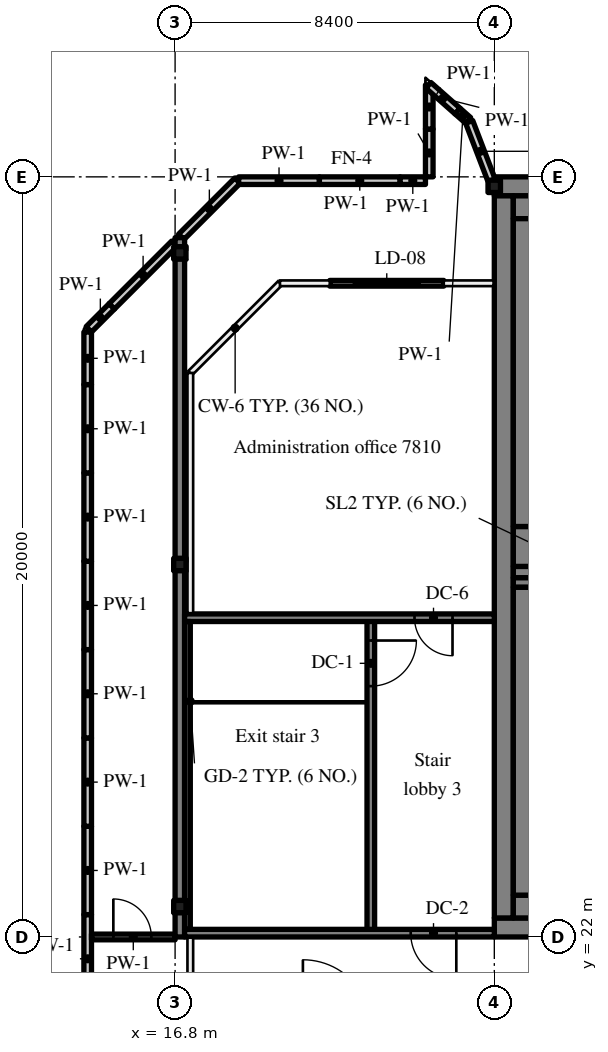
"""IFC4 building model, lengths in metres.
Left out: names, types, materials, properties, quantities, classifications, styles, units other than length and angle.
Written with IfcOpenShell. Run it as: python <this file> out.ifc"""

import sys

from ifc_helpers import new_model, si_unit, direction, frame, frame_2d, origin, origin_2d, place, context, subcontext, project, spatial, rectangle, hollow_circle, extrude, source, transform, mapped, element, fill, save


model = new_model("IFC4")
c1 = context("Model", 3, precision=1e-05, world=origin(), true_north=direction((0.0, 1.0)))
c2 = subcontext(c1, "Body", "Model", "MODEL_VIEW")
j1 = project(units=[si_unit("LENGTHUNIT", "METRE"), si_unit("PLANEANGLEUNIT", "RADIAN")], contexts=[c1])
p1 = place(None, origin())
s1 = spatial("IfcSite", under=j1, at=p1, CompositionType="ELEMENT")
p2 = place(p1, origin())
s2 = spatial("IfcBuilding", under=s1, at=p2, CompositionType="ELEMENT")
p3 = place(p2, frame((0.0, 0.0, 329.7)))
s3 = spatial("IfcBuildingStorey", under=s2, at=p3, CompositionType="ELEMENT", Elevation=329.7)
m1 = source(origin(), c2, "Body", "SweptSolid", [
    extrude(rectangle(XDim=50.4, YDim=0.5, at=frame_2d((25.2, 0.0))), origin(), (0.0, 0.0, 1.0), 4.72),
])
p4 = place(p3, frame((25.2, 22.25, 0.0), z_axis=(0.0, 0.0, 1.0), x_axis=(1.0, 0.0, 0.0)))
e1 = element("IfcWall", 1, at=p4, inside=s3, PredefinedType="SHEAR", context=c2, shape_type="MappedRepresentation", body=[
    mapped(m1, transform((0.0, 0.0, 0.0), scale=1.0)),
])
m2 = source(origin(), c2, "Body", "SweptSolid", [
    extrude(rectangle(XDim=1.8, YDim=2.1, at=frame_2d((0.9, 1.05))), frame((0.0, 0.26, 0.0), z_axis=(0.0, -1.0, 0.0), x_axis=(1.0, 0.0, 0.0)), (0.0, 0.0, 1.0), 0.52),
])
p5 = place(p4, frame((15.9, 0.0, 0.0)))
e2 = element("IfcOpeningElement", 2, at=p5, cuts=e1, PredefinedType="OPENING", context=c2, shape_type="MappedRepresentation", body=[
    mapped(m2, transform((0.0, 0.0, 0.0), scale=1.0)),
])
m3 = source(origin(), c2, "Body", "SweptSolid", [
    extrude(rectangle(XDim=0.9, YDim=2.1, at=frame_2d((0.45, 1.05))), frame((0.0, 0.26, 0.0), z_axis=(0.0, -1.0, 0.0), x_axis=(1.0, 0.0, 0.0)), (0.0, 0.0, 1.0), 0.52),
])
p6 = place(p4, frame((21.525, 0.0, 0.0)))
e3 = element("IfcOpeningElement", 3, at=p6, cuts=e1, PredefinedType="OPENING", context=c2, shape_type="MappedRepresentation", body=[
    mapped(m3, transform((0.0, 0.0, 0.0), scale=1.0)),
])
p7 = place(p4, frame((32.7, 0.0, 0.0)))
e4 = element("IfcOpeningElement", 4, at=p7, cuts=e1, PredefinedType="OPENING", context=c2, shape_type="MappedRepresentation", body=[
    mapped(m2, transform((0.0, 0.0, 0.0), scale=1.0)),
])
p8 = place(p4, frame((39.825, 0.0, 0.0)))
e5 = element("IfcOpeningElement", 5, at=p8, cuts=e1, PredefinedType="OPENING", context=c2, shape_type="MappedRepresentation", body=[
    mapped(m3, transform((0.0, 0.0, 0.0), scale=1.0)),
])
p9 = place(p4, frame((27.975, 0.0, 0.0)))
e6 = element("IfcOpeningElement", 6, at=p9, cuts=e1, PredefinedType="OPENING", context=c2, shape_type="MappedRepresentation", body=[
    mapped(m3, transform((0.0, 0.0, 0.0), scale=1.0)),
])
m4 = source(origin(), c2, "Body", "SweptSolid", [
    extrude(rectangle(XDim=1.2, YDim=2.1, at=frame_2d((0.6, 1.05))), frame((0.0, 0.26, 0.0), z_axis=(0.0, -1.0, 0.0), x_axis=(1.0, 0.0, 0.0)), (0.0, 0.0, 1.0), 0.52),
])
p10 = place(p4, frame((6.5, 0.0, 0.0)))
e7 = element("IfcOpeningElement", 7, at=p10, cuts=e1, PredefinedType="OPENING", context=c2, shape_type="MappedRepresentation", body=[
    mapped(m4, transform((0.0, 0.0, 0.0), scale=1.0)),
])
p11 = place(p4, frame((47.975, 0.0, 0.0)))
e8 = element("IfcOpeningElement", 8, at=p11, cuts=e1, PredefinedType="OPENING", context=c2, shape_type="MappedRepresentation", body=[
    mapped(m4, transform((0.0, 0.0, 0.0), scale=1.0)),
])
p12 = place(p3, frame((25.2, 41.75, 0.0), z_axis=(0.0, 0.0, 1.0), x_axis=(1.0, 0.0, 0.0)))
e9 = element("IfcWall", 9, at=p12, inside=s3, PredefinedType="SHEAR", context=c2, shape_type="MappedRepresentation", body=[
    mapped(m1, transform((0.0, 0.0, 0.0), scale=1.0)),
])
m5 = source(origin(), c2, "Body", "SweptSolid", [
    extrude(rectangle(XDim=19.0, YDim=0.5, at=frame_2d((9.5, 0.0))), origin(), (0.0, 0.0, 1.0), 4.72),
])
p13 = place(p3, frame((25.45, 22.5, 0.0), z_axis=(0.0, 0.0, 1.0), x_axis=(0.0, 1.0, 0.0)))
e10 = element("IfcWall", 10, at=p13, inside=s3, PredefinedType="SHEAR", context=c2, shape_type="MappedRepresentation", body=[
    mapped(m5, transform((0.0, 0.0, 0.0), scale=1.0)),
])
m6 = source(origin(), c2, "Body", "SweptSolid", [
    extrude(rectangle(XDim=7.75, YDim=0.3, at=frame_2d((3.875, 0.0))), origin(), (0.0, 0.0, 1.0), 4.72),
])
p14 = place(p3, frame((25.7, 31.6, 0.0), z_axis=(0.0, 0.0, 1.0), x_axis=(1.0, 0.0, 0.0)))
e11 = element("IfcWall", 11, at=p14, inside=s3, PredefinedType="SHEAR", context=c2, shape_type="MappedRepresentation", body=[
    mapped(m6, transform((0.0, 0.0, 0.0), scale=1.0)),
])
m7 = source(origin(), c2, "Body", "SweptSolid", [
    extrude(rectangle(XDim=1.1, YDim=2.1, at=frame_2d((0.55, 1.05))), frame((0.0, 0.16, 0.0), z_axis=(0.0, -1.0, 0.0), x_axis=(1.0, 0.0, 0.0)), (0.0, 0.0, 1.0), 0.32),
])
p15 = place(p14, frame((6.05, 0.0, 0.0)))
e12 = element("IfcOpeningElement", 12, at=p15, cuts=e11, PredefinedType="OPENING", context=c2, shape_type="MappedRepresentation", body=[
    mapped(m7, transform((0.0, 0.0, 0.0), scale=1.0)),
])
m8 = source(origin(), c2, "Body", "SweptSolid", [
    extrude(rectangle(XDim=18.4, YDim=0.25, at=frame_2d((9.2, 0.0))), origin(), (0.0, 0.0, 1.0), 4.72),
])
p16 = place(p3, frame((16.925, 22.0, 0.0), z_axis=(0.0, 0.0, 1.0), x_axis=(0.0, 1.0, 0.0)))
e13 = element("IfcWall", 13, at=p16, inside=s3, PredefinedType="SHEAR", context=c2, shape_type="MappedRepresentation", body=[
    mapped(m8, transform((0.0, 0.0, 0.0), scale=1.0)),
])
m9 = source(origin(), c2, "Body", "SweptSolid", [
    extrude(hollow_circle(Radius=0.162, WallThickness=0.012, at=origin_2d()), origin(), (0.0, 0.0, 1.0), 4.4),
])
for number, where, z_axis, x_axis in (
    (14, (25.2, 41.75, 5.0), (0.0, 0.0, 1.0), (1.0, 0.0, 0.0)),
    (15, (16.925, 22.8, 5.0), (0.0, 0.0, 1.0), (1.0, 0.0, 0.0)),
    (16, (16.925, 31.8, 5.0), (0.0, 0.0, 1.0), (1.0, 0.0, 0.0)),
    (17, (16.925, 40.0, 5.0), (0.0, 0.0, 1.0), (1.0, 0.0, 0.0)),
):
    element("IfcColumn", number, at=place(p3, frame(where, z_axis=z_axis, x_axis=x_axis)), inside=s3, PredefinedType="COLUMN", context=c2, shape_type="MappedRepresentation", body=[
        mapped(m9, transform((0.0, 0.0, 0.0), scale=1.0)),
    ])
m10 = source(origin(), c2, "Body", "SweptSolid", [
    extrude(rectangle(XDim=2.324, YDim=0.2, at=frame_2d((1.162, 0.0))), origin(), (0.0, 0.0, 1.0), 1.1),
])
p17 = place(p3, frame((14.5, 20.263, 0.0), z_axis=(0.0, 0.0, 1.0), x_axis=(0.0, 1.0, 0.0)))
e18 = element("IfcWall", 18, at=p17, inside=s3, PredefinedType="PARAPET", context=c2, shape_type="MappedRepresentation", body=[
    mapped(m10, transform((0.0, 0.0, 0.0), scale=1.0)),
])
m11 = source(origin(), c2, "Body", "SweptSolid", [
    extrude(rectangle(XDim=2.324, YDim=0.2, at=frame_2d((1.162, 0.0))), origin(), (0.0, 0.0, 1.0), 1.1),
])
p18 = place(p3, frame((14.5, 22.588, 0.0), z_axis=(0.0, 0.0, 1.0), x_axis=(0.0, 1.0, 0.0)))
e19 = element("IfcWall", 19, at=p18, inside=s3, PredefinedType="PARAPET", context=c2, shape_type="MappedRepresentation", body=[
    mapped(m11, transform((0.0, 0.0, 0.0), scale=1.0)),
])
for number, where, z_axis, x_axis in (
    (20, (14.5, 24.912, 0.0), (0.0, 0.0, 1.0), (0.0, 1.0, 0.0)),
    (21, (14.5, 27.237, 0.0), (0.0, 0.0, 1.0), (0.0, 1.0, 0.0)),
    (22, (14.5, 29.561, 0.0), (0.0, 0.0, 1.0), (0.0, 1.0, 0.0)),
):
    element("IfcWall", number, at=place(p3, frame(where, z_axis=z_axis, x_axis=x_axis)), inside=s3, PredefinedType="PARAPET", context=c2, shape_type="MappedRepresentation", body=[
        mapped(m10, transform((0.0, 0.0, 0.0), scale=1.0)),
    ])
p19 = place(p3, frame((14.5, 31.885, 0.0), z_axis=(0.0, 0.0, 1.0), x_axis=(0.0, 1.0, 0.0)))
e23 = element("IfcWall", 23, at=p19, inside=s3, PredefinedType="PARAPET", context=c2, shape_type="MappedRepresentation", body=[
    mapped(m11, transform((0.0, 0.0, 0.0), scale=1.0)),
])
p20 = place(p3, frame((14.5, 34.21, 0.0), z_axis=(0.0, 0.0, 1.0), x_axis=(0.0, 1.0, 0.0)))
e24 = element("IfcWall", 24, at=p20, inside=s3, PredefinedType="PARAPET", context=c2, shape_type="MappedRepresentation", body=[
    mapped(m10, transform((0.0, 0.0, 0.0), scale=1.0)),
])
m12 = source(origin(), c2, "Body", "SweptSolid", [
    extrude(rectangle(XDim=1.383, YDim=0.2, at=frame_2d((0.691, 0.0))), origin(), (0.0, 0.0, 1.0), 1.1),
])
p21 = place(p3, frame((14.5, 36.534, 0.0), z_axis=(0.0, 0.0, 1.0), x_axis=(0.0, 1.0, 0.0)))
e25 = element("IfcWall", 25, at=p21, inside=s3, PredefinedType="PARAPET", context=c2, shape_type="MappedRepresentation", body=[
    mapped(m12, transform((0.0, 0.0, 0.0), scale=1.0)),
])
m13 = source(origin(), c2, "Body", "SweptSolid", [
    extrude(rectangle(XDim=0.859, YDim=0.2, at=frame_2d((0.429, 0.0))), origin(), (0.0, 0.0, 1.0), 1.1),
])
p22 = place(p3, frame((14.529, 37.988, 0.0), z_axis=(0.0, 0.0, 1.0), x_axis=(0.707106781187, 0.707106781187, 0.0)))
e26 = element("IfcWall", 26, at=p22, inside=s3, PredefinedType="PARAPET", context=c2, shape_type="MappedRepresentation", body=[
    mapped(m13, transform((0.0, 0.0, 0.0), scale=1.0)),
])
p23 = place(p3, frame((15.136, 38.595, 0.0), z_axis=(0.0, 0.0, 1.0), x_axis=(0.707106781187, 0.707106781187, 0.0)))
e27 = element("IfcWall", 27, at=p23, inside=s3, PredefinedType="PARAPET", context=c2, shape_type="MappedRepresentation", body=[
    mapped(m11, transform((0.0, 0.0, 0.0), scale=1.0)),
])
m14 = source(origin(), c2, "Body", "SweptSolid", [
    extrude(rectangle(XDim=2.093, YDim=0.2, at=frame_2d((1.046, 0.0))), origin(), (0.0, 0.0, 1.0), 1.1),
])
p24 = place(p3, frame((16.961, 40.42, 0.0), z_axis=(0.0, 0.0, 1.0), x_axis=(0.707106781187, 0.707106781187, 0.0)))
e28 = element("IfcWall", 28, at=p24, inside=s3, PredefinedType="PARAPET", context=c2, shape_type="MappedRepresentation", body=[
    mapped(m14, transform((0.0, 0.0, 0.0), scale=1.0)),
])
m15 = source(origin(), c2, "Body", "SweptSolid", [
    extrude(rectangle(XDim=2.124, YDim=0.2, at=frame_2d((1.062, 0.0))), origin(), (0.0, 0.0, 1.0), 1.1),
])
p25 = place(p3, frame((18.473, 41.9, 0.0), z_axis=(0.0, 0.0, 1.0), x_axis=(1.0, 0.0, 0.0)))
e29 = element("IfcWall", 29, at=p25, inside=s3, PredefinedType="PARAPET", context=c2, shape_type="MappedRepresentation", body=[
    mapped(m15, transform((0.0, 0.0, 0.0), scale=1.0)),
])
m16 = source(origin(), c2, "Body", "SweptSolid", [
    extrude(rectangle(XDim=2.125, YDim=0.2, at=frame_2d((1.062, 0.0))), origin(), (0.0, 0.0, 1.0), 1.1),
])
p26 = place(p3, frame((20.597, 41.9, 0.0), z_axis=(0.0, 0.0, 1.0), x_axis=(1.0, 0.0, 0.0)))
e30 = element("IfcWall", 30, at=p26, inside=s3, PredefinedType="PARAPET", context=c2, shape_type="MappedRepresentation", body=[
    mapped(m16, transform((0.0, 0.0, 0.0), scale=1.0)),
])
m17 = source(origin(), c2, "Body", "SweptSolid", [
    extrude(rectangle(XDim=0.666, YDim=0.2, at=frame_2d((0.333, 0.0))), origin(), (0.0, 0.0, 1.0), 1.1),
])
p27 = place(p3, frame((22.722, 41.9, 0.0), z_axis=(0.0, 0.0, 1.0), x_axis=(1.0, 0.0, 0.0)))
e31 = element("IfcWall", 31, at=p27, inside=s3, PredefinedType="PARAPET", context=c2, shape_type="MappedRepresentation", body=[
    mapped(m17, transform((0.0, 0.0, 0.0), scale=1.0)),
])
m18 = source(origin(), c2, "Body", "SweptSolid", [
    extrude(rectangle(XDim=1.258, YDim=0.2, at=frame_2d((0.629, 0.0))), origin(), (0.0, 0.0, 1.0), 1.1),
])
p28 = place(p3, frame((23.488, 42.0, 0.0), z_axis=(0.0, 0.0, 1.0), x_axis=(0.0, 1.0, 0.0)))
e32 = element("IfcWall", 32, at=p28, inside=s3, PredefinedType="PARAPET", context=c2, shape_type="MappedRepresentation", body=[
    mapped(m18, transform((0.0, 0.0, 0.0), scale=1.0)),
])
m19 = source(origin(), c2, "Body", "SweptSolid", [
    extrude(rectangle(XDim=1.16, YDim=0.2, at=frame_2d((0.58, 0.0))), origin(), (0.0, 0.0, 1.0), 1.1),
])
p29 = place(p3, frame((23.488, 43.258, 0.0), z_axis=(0.0, 0.0, 1.0), x_axis=(0.0, 1.0, 0.0)))
e33 = element("IfcWall", 33, at=p29, inside=s3, PredefinedType="PARAPET", context=c2, shape_type="MappedRepresentation", body=[
    mapped(m19, transform((0.0, 0.0, 0.0), scale=1.0)),
])
m20 = source(origin(), c2, "Body", "SweptSolid", [
    extrude(rectangle(XDim=1.024, YDim=0.2, at=frame_2d((0.512, 0.0))), origin(), (0.0, 0.0, 1.0), 1.1),
])
p30 = place(p3, frame((23.466, 44.408, 0.0), z_axis=(0.0, 0.0, 1.0), x_axis=(0.749719578651, -0.661755659884, 0.0)))
e34 = element("IfcWall", 34, at=p30, inside=s3, PredefinedType="PARAPET", context=c2, shape_type="MappedRepresentation", body=[
    mapped(m20, transform((0.0, 0.0, 0.0), scale=1.0)),
])
m21 = source(origin(), c2, "Body", "SweptSolid", [
    extrude(rectangle(XDim=0.372, YDim=0.2, at=frame_2d((0.186, 0.0))), origin(), (0.0, 0.0, 1.0), 1.1),
])
p31 = place(p3, frame((24.233, 43.73, 0.0), z_axis=(0.0, 0.0, 1.0), x_axis=(0.749761145018, -0.661708565323, 0.0)))
e35 = element("IfcWall", 35, at=p31, inside=s3, PredefinedType="PARAPET", context=c2, shape_type="MappedRepresentation", body=[
    mapped(m21, transform((0.0, 0.0, 0.0), scale=1.0)),
])
m22 = source(origin(), c2, "Body", "SweptSolid", [
    extrude(rectangle(XDim=1.655, YDim=0.2, at=frame_2d((0.827, 0.0))), origin(), (0.0, 0.0, 1.0), 1.1),
])
p32 = place(p3, frame((24.539, 43.445, 0.0), z_axis=(0.0, 0.0, 1.0), x_axis=(0.357614417071, -0.933869331707, 0.0)))
e36 = element("IfcWall", 36, at=p32, inside=s3, PredefinedType="PARAPET", context=c2, shape_type="MappedRepresentation", body=[
    mapped(m22, transform((0.0, 0.0, 0.0), scale=1.0)),
])
m23 = source(origin(), c2, "Body", "SweptSolid", [
    extrude(rectangle(XDim=3.0, YDim=0.15, at=frame_2d((1.5, 0.0))), origin(), (0.0, 0.0, 1.0), 4.72),
])
p33 = place(p3, frame((23.87, 39.2, 0.0), z_axis=(0.0, 0.0, 1.0), x_axis=(-1.0, 0.0, 0.0)))
e37 = element("IfcWall", 37, at=p33, inside=s3, PredefinedType="SOLIDWALL", context=c2, shape_type="MappedRepresentation", body=[
    mapped(m23, transform((0.0, 0.0, 0.0), scale=1.0)),
])
m24 = source(origin(), c2, "Body", "SweptSolid", [
    extrude(rectangle(XDim=1.8, YDim=2.4, at=frame_2d((0.9, 1.2))), frame((0.0, 0.085, 0.0), z_axis=(0.0, -1.0, 0.0), x_axis=(1.0, 0.0, 0.0)), (0.0, 0.0, 1.0), 0.17),
])
p34 = place(p33, frame((0.6, 0.0, 0.0)))
e38 = element("IfcOpeningElement", 38, at=p34, cuts=e37, PredefinedType="OPENING", context=c2, shape_type="MappedRepresentation", body=[
    mapped(m24, transform((0.0, 0.0, 0.0), scale=1.0)),
])
m25 = source(origin(), c2, "Body", "SweptSolid", [
    extrude(rectangle(XDim=8.3, YDim=0.2, at=frame_2d((4.15, 0.0))), origin(), (0.0, 0.0, 1.0), 4.72),
])
p35 = place(p3, frame((21.95, 22.1, 0.0), z_axis=(0.0, 0.0, 1.0), x_axis=(0.0, 1.0, 0.0)))
e39 = element("IfcWall", 39, at=p35, inside=s3, PredefinedType="SOLIDWALL", context=c2, shape_type="MappedRepresentation", body=[
    mapped(m25, transform((0.0, 0.0, 0.0), scale=1.0)),
])
m26 = source(origin(), c2, "Body", "SweptSolid", [
    extrude(rectangle(XDim=1.2, YDim=2.1, at=frame_2d((0.6, 1.05))), frame((0.0, 0.11, 0.0), z_axis=(0.0, -1.0, 0.0), x_axis=(1.0, 0.0, 0.0)), (0.0, 0.0, 1.0), 0.22),
])
p36 = place(p35, frame((6.5, 0.0, 0.0)))
e40 = element("IfcOpeningElement", 40, at=p36, cuts=e39, PredefinedType="OPENING", context=c2, shape_type="MappedRepresentation", body=[
    mapped(m26, transform((0.0, 0.0, 0.0), scale=1.0)),
])
m27 = source(origin(), c2, "Body", "SweptSolid", [
    extrude(rectangle(XDim=8.15, YDim=0.2, at=frame_2d((4.075, 0.0))), origin(), (0.0, 0.0, 1.0), 4.72),
])
p37 = place(p3, frame((17.05, 22.1, 0.0), z_axis=(0.0, 0.0, 1.0), x_axis=(1.0, 0.0, 0.0)))
e41 = element("IfcWall", 41, at=p37, inside=s3, PredefinedType="SOLIDWALL", context=c2, shape_type="MappedRepresentation", body=[
    mapped(m27, transform((0.0, 0.0, 0.0), scale=1.0)),
])
p38 = place(p37, frame((5.95, 0.0, 0.0)))
e42 = element("IfcOpeningElement", 42, at=p38, cuts=e41, PredefinedType="OPENING", context=c2, shape_type="MappedRepresentation", body=[
    mapped(m26, transform((0.0, 0.0, 0.0), scale=1.0)),
])
p39 = place(p3, frame((17.05, 30.4, 0.0), z_axis=(0.0, 0.0, 1.0), x_axis=(1.0, 0.0, 0.0)))
e43 = element("IfcWall", 43, at=p39, inside=s3, PredefinedType="SOLIDWALL", context=c2, shape_type="MappedRepresentation", body=[
    mapped(m27, transform((0.0, 0.0, 0.0), scale=1.0)),
])
m28 = source(origin(), c2, "Body", "SweptSolid", [
    extrude(rectangle(XDim=1.0, YDim=2.1, at=frame_2d((0.5, 1.05))), frame((0.0, 0.11, 0.0), z_axis=(0.0, -1.0, 0.0), x_axis=(1.0, 0.0, 0.0)), (0.0, 0.0, 1.0), 0.22),
])
p40 = place(p39, frame((6.05, 0.0, 0.0)))
e44 = element("IfcOpeningElement", 44, at=p40, cuts=e43, PredefinedType="OPENING", context=c2, shape_type="MappedRepresentation", body=[
    mapped(m28, transform((0.0, 0.0, 0.0), scale=1.0)),
])
m29 = source(origin(), c2, "Body", "SweptSolid", [
    extrude(rectangle(XDim=5.25, YDim=0.6, at=frame_2d((2.625, 0.0))), origin(), (0.0, 0.0, 1.0), 4.72),
])
p41 = place(p3, frame((25.7, 22.8, 0.0), z_axis=(0.0, 0.0, 1.0), x_axis=(1.0, 0.0, 0.0)))
e45 = element("IfcWall", 45, at=p41, inside=s3, PredefinedType="SOLIDWALL", context=c2, shape_type="MappedRepresentation", body=[
    mapped(m29, transform((0.0, 0.0, 0.0), scale=1.0)),
])
m30 = source(origin(), c2, "Body", "SweptSolid", [
    extrude(rectangle(XDim=5.25, YDim=0.25, at=frame_2d((2.625, 0.0))), origin(), (0.0, 0.0, 1.0), 4.72),
])
p42 = place(p3, frame((25.7, 31.325, 0.0), z_axis=(0.0, 0.0, 1.0), x_axis=(1.0, 0.0, 0.0)))
e46 = element("IfcWall", 46, at=p42, inside=s3, PredefinedType="SOLIDWALL", context=c2, shape_type="MappedRepresentation", body=[
    mapped(m30, transform((0.0, 0.0, 0.0), scale=1.0)),
])
m31 = source(origin(), c2, "Body", "SweptSolid", [
    extrude(rectangle(XDim=8.1, YDim=0.6, at=frame_2d((4.05, 0.0))), origin(), (0.0, 0.0, 1.0), 4.72),
])
p43 = place(p3, frame((26.0, 23.1, 0.0), z_axis=(0.0, 0.0, 1.0), x_axis=(0.0, 1.0, 0.0)))
e47 = element("IfcWall", 47, at=p43, inside=s3, PredefinedType="SOLIDWALL", context=c2, shape_type="MappedRepresentation", body=[
    mapped(m31, transform((0.0, 0.0, 0.0), scale=1.0)),
])
m32 = source(origin(), c2, "Body", "SweptSolid", [
    extrude(rectangle(XDim=8.1, YDim=0.15, at=frame_2d((4.05, 0.0))), origin(), (0.0, 0.0, 1.0), 4.72),
])
p44 = place(p3, frame((17.125, 22.2, 0.0), z_axis=(0.0, 0.0, 1.0), x_axis=(0.0, 1.0, 0.0)))
e48 = element("IfcWall", 48, at=p44, inside=s3, PredefinedType="SOLIDWALL", context=c2, shape_type="MappedRepresentation", body=[
    mapped(m32, transform((0.0, 0.0, 0.0), scale=1.0)),
])
p45 = place(p3, frame((25.7, 41.2, 0.0), z_axis=(0.0, 0.0, 1.0), x_axis=(1.0, 0.0, 0.0)))
e49 = element("IfcWall", 49, at=p45, inside=s3, PredefinedType="SOLIDWALL", context=c2, shape_type="MappedRepresentation", body=[
    mapped(m29, transform((0.0, 0.0, 0.0), scale=1.0)),
])
m33 = source(origin(), c2, "Body", "SweptSolid", [
    extrude(rectangle(XDim=5.25, YDim=1.05, at=frame_2d((2.625, 0.0))), origin(), (0.0, 0.0, 1.0), 4.72),
])
p46 = place(p3, frame((25.7, 32.275, 0.0), z_axis=(0.0, 0.0, 1.0), x_axis=(1.0, 0.0, 0.0)))
e50 = element("IfcWall", 50, at=p46, inside=s3, PredefinedType="SOLIDWALL", context=c2, shape_type="MappedRepresentation", body=[
    mapped(m33, transform((0.0, 0.0, 0.0), scale=1.0)),
])
p47 = place(p3, frame((26.0, 32.8, 0.0), z_axis=(0.0, 0.0, 1.0), x_axis=(0.0, 1.0, 0.0)))
e51 = element("IfcWall", 51, at=p47, inside=s3, PredefinedType="SOLIDWALL", context=c2, shape_type="MappedRepresentation", body=[
    mapped(m31, transform((0.0, 0.0, 0.0), scale=1.0)),
])
m34 = source(origin(), c2, "Body", "SweptSolid", [
    extrude(rectangle(XDim=2.2, YDim=0.15, at=frame_2d((1.1, 0.0))), origin(), (0.0, 0.0, 1.0), 4.02),
])
p48 = place(p3, frame((14.6, 22.0, 0.0), z_axis=(0.0, 0.0, 1.0), x_axis=(1.0, 0.0, 0.0)))
e52 = element("IfcWall", 52, at=p48, inside=s3, PredefinedType="PARTITIONING", context=c2, shape_type="MappedRepresentation", body=[
    mapped(m34, transform((0.0, 0.0, 0.0), scale=1.0)),
])
m35 = source(origin(), c2, "Body", "SweptSolid", [
    extrude(rectangle(XDim=1.0, YDim=2.1, at=frame_2d((0.5, 1.05))), frame((0.0, 0.085, 0.0), z_axis=(0.0, -1.0, 0.0), x_axis=(1.0, 0.0, 0.0)), (0.0, 0.0, 1.0), 0.17),
])
p49 = place(p48, frame((0.575, 0.0, 0.0)))
e53 = element("IfcOpeningElement", 53, at=p49, cuts=e52, PredefinedType="OPENING", context=c2, shape_type="MappedRepresentation", body=[
    mapped(m35, transform((0.0, 0.0, 0.0), scale=1.0)),
])
m36 = source(origin(), c2, "Body", "SweptSolid", [
    extrude(rectangle(XDim=1.8, YDim=2.4, at=frame_2d((0.9, 1.2))), frame((0.0, 0.025, 0.0), z_axis=(0.0, -1.0, 0.0), x_axis=(1.0, 0.0, 0.0)), (0.0, 0.0, 1.0), 0.05),
])
p50 = place(p34, origin())
e54 = element("IfcDoor", 54, at=p50, inside=s3, OperationType="SLIDING_TO_RIGHT", PredefinedType="DOOR", context=c2, shape_type="MappedRepresentation", body=[
    mapped(m36, transform((0.0, 0.0, 0.0), scale=1.0)),
])
fill(e38, e54)
m37 = source(origin(), c2, "Body", "SweptSolid", [
    extrude(rectangle(XDim=1.2, YDim=2.1, at=frame_2d((0.6, 1.05))), frame((0.0, 0.025, 0.0), z_axis=(0.0, -1.0, 0.0), x_axis=(1.0, 0.0, 0.0)), (0.0, 0.0, 1.0), 0.05),
])
p51 = place(p36, origin())
e55 = element("IfcDoor", 55, at=p51, inside=s3, OperationType="SINGLE_SWING_RIGHT", PredefinedType="DOOR", context=c2, shape_type="MappedRepresentation", body=[
    mapped(m37, transform((0.0, 0.0, 0.0), scale=1.0)),
])
fill(e40, e55)
p52 = place(p38, origin())
e56 = element("IfcDoor", 56, at=p52, inside=s3, OperationType="SINGLE_SWING_RIGHT", PredefinedType="DOOR", context=c2, shape_type="MappedRepresentation", body=[
    mapped(m37, transform((0.0, 0.0, 0.0), scale=1.0)),
])
fill(e42, e56)
m38 = source(origin(), c2, "Body", "SweptSolid", [
    extrude(rectangle(XDim=1.0, YDim=2.1, at=frame_2d((0.5, 1.05))), frame((0.0, 0.025, 0.0), z_axis=(0.0, -1.0, 0.0), x_axis=(1.0, 0.0, 0.0)), (0.0, 0.0, 1.0), 0.05),
])
p53 = place(p40, origin())
e57 = element("IfcDoor", 57, at=p53, inside=s3, OperationType="SINGLE_SWING_RIGHT", PredefinedType="DOOR", context=c2, shape_type="MappedRepresentation", body=[
    mapped(m38, transform((0.0, 0.0, 0.0), scale=1.0)),
])
fill(e44, e57)
p54 = place(p49, origin())
e58 = element("IfcDoor", 58, at=p54, inside=s3, OperationType="SINGLE_SWING_LEFT", PredefinedType="DOOR", context=c2, shape_type="MappedRepresentation", body=[
    mapped(m38, transform((0.0, 0.0, 0.0), scale=1.0)),
])
fill(e53, e58)
save(model, sys.argv[1])
